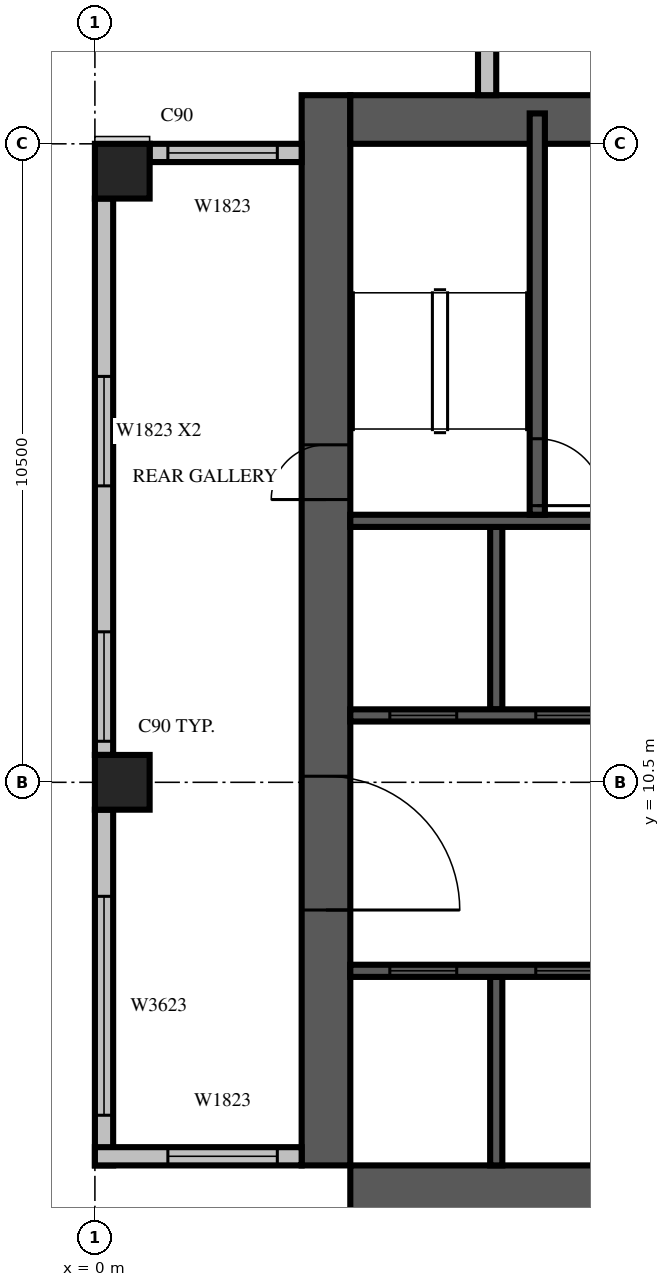
"""IFC4 building model, lengths in metres.
Left out: names, types, materials, properties, quantities, classifications, styles, units other than length and angle.
Written with IfcOpenShell. Run it as: python <this file> out.ifc"""

import sys

from ifc_helpers import new_model, si_unit, direction, frame, frame_2d, origin, origin_2d, place, context, subcontext, project, spatial, rectangle, extrude, source, transform, mapped, element, fill, save


model = new_model("IFC4")
c1 = context("Model", 3, precision=1e-05, world=origin(), true_north=direction((0.0, 1.0)))
c2 = subcontext(c1, "Body", "Model", "MODEL_VIEW")
j1 = project(units=[si_unit("LENGTHUNIT", "METRE"), si_unit("PLANEANGLEUNIT", "RADIAN")], contexts=[c1])
p1 = place(None, origin())
s1 = spatial("IfcSite", under=j1, at=p1, CompositionType="ELEMENT")
p2 = place(p1, origin())
s2 = spatial("IfcBuilding", under=s1, at=p2, CompositionType="ELEMENT")
p3 = place(p2, frame((0.0, 0.0, 212.0)))
s3 = spatial("IfcBuildingStorey", under=s2, at=p3, CompositionType="ELEMENT", Elevation=212.0)
m1 = source(origin(), c2, "Body", "SweptSolid", [
    extrude(rectangle(XDim=0.9, YDim=0.9, at=origin_2d()), origin(), (0.0, 0.0, 1.0), 3.8),
])
for number, where, z_axis, x_axis in (
    (1, (0.45, 10.5, 0.0), (0.0, 0.0, 1.0), (1.0, 0.0, 0.0)),
    (2, (0.45, 20.55, 0.0), (0.0, 0.0, 1.0), (1.0, 0.0, 0.0)),
):
    element("IfcColumn", number, at=place(p3, frame(where, z_axis=z_axis, x_axis=x_axis)), inside=s3, PredefinedType="COLUMN", context=c2, shape_type="MappedRepresentation", body=[
        mapped(m1, transform((0.0, 0.0, 0.0), scale=1.0)),
    ])
m2 = source(origin(), c2, "Body", "SweptSolid", [
    extrude(rectangle(XDim=17.6, YDim=0.8, at=frame_2d((8.8, 0.0))), origin(), (0.0, 0.0, 1.0), 3.8),
])
p4 = place(p3, frame((3.8, 4.2, 0.0), z_axis=(0.0, 0.0, 1.0), x_axis=(0.0, 1.0, 0.0)))
e3 = element("IfcWall", 3, at=p4, inside=s3, PredefinedType="SHEAR", context=c2, shape_type="MappedRepresentation", body=[
    mapped(m2, transform((0.0, 0.0, 0.0), scale=1.0)),
])
m3 = source(origin(), c2, "Body", "SweptSolid", [
    extrude(rectangle(XDim=2.2, YDim=2.1, at=frame_2d((1.1, 1.05))), frame((0.0, 0.41, 0.0), z_axis=(0.0, -1.0, 0.0), x_axis=(1.0, 0.0, 0.0)), (0.0, 0.0, 1.0), 0.82),
])
p5 = place(p4, frame((4.2, 0.0, 0.0)))
e4 = element("IfcOpeningElement", 4, at=p5, cuts=e3, PredefinedType="OPENING", context=c2, shape_type="MappedRepresentation", body=[
    mapped(m3, transform((0.0, 0.0, 0.0), scale=1.0)),
])
m4 = source(origin(), c2, "Body", "SweptSolid", [
    extrude(rectangle(XDim=0.9, YDim=2.1, at=frame_2d((0.45, 1.05))), frame((0.0, 0.41, 0.0), z_axis=(0.0, -1.0, 0.0), x_axis=(1.0, 0.0, 0.0)), (0.0, 0.0, 1.0), 0.82),
])
p6 = place(p4, frame((10.95, 0.0, 0.0)))
e5 = element("IfcOpeningElement", 5, at=p6, cuts=e3, PredefinedType="OPENING", context=c2, shape_type="MappedRepresentation", body=[
    mapped(m4, transform((0.0, 0.0, 0.0), scale=1.0)),
])
p7 = place(p3, frame((4.2, 3.8, 0.0), z_axis=(0.0, 0.0, 1.0), x_axis=(1.0, 0.0, 0.0)))
e6 = element("IfcWall", 6, at=p7, inside=s3, PredefinedType="SHEAR", context=c2, shape_type="MappedRepresentation", body=[
    mapped(m2, transform((0.0, 0.0, 0.0), scale=1.0)),
])
p8 = place(p7, frame((11.55, 0.0, 0.0)))
e7 = element("IfcOpeningElement", 7, at=p8, cuts=e6, PredefinedType="OPENING", context=c2, shape_type="MappedRepresentation", body=[
    mapped(m4, transform((0.0, 0.0, 0.0), scale=1.0)),
])
m5 = source(origin(), c2, "Body", "SweptSolid", [
    extrude(rectangle(XDim=16.8, YDim=0.8, at=frame_2d((8.4, 0.0))), origin(), (0.0, 0.0, 1.0), 3.8),
])
p9 = place(p3, frame((4.2, 21.4, 0.0), z_axis=(0.0, 0.0, 1.0), x_axis=(1.0, 0.0, 0.0)))
e8 = element("IfcWall", 8, at=p9, inside=s3, PredefinedType="SHEAR", context=c2, shape_type="MappedRepresentation", body=[
    mapped(m5, transform((0.0, 0.0, 0.0), scale=1.0)),
])
m6 = source(origin(), c2, "Body", "SweptSolid", [
    extrude(rectangle(XDim=1.2, YDim=2.1, at=frame_2d((0.6, 1.05))), frame((0.0, 0.41, 0.0), z_axis=(0.0, -1.0, 0.0), x_axis=(1.0, 0.0, 0.0)), (0.0, 0.0, 1.0), 0.82),
])
p10 = place(p9, frame((6.2, 0.0, 0.0)))
e9 = element("IfcOpeningElement", 9, at=p10, cuts=e8, PredefinedType="OPENING", context=c2, shape_type="MappedRepresentation", body=[
    mapped(m6, transform((0.0, 0.0, 0.0), scale=1.0)),
])
m7 = source(origin(), c2, "Body", "SweptSolid", [
    extrude(rectangle(XDim=16.6, YDim=0.3, at=frame_2d((8.3, 0.0))), origin(), (0.0, 0.0, 1.0), 3.4),
])
p11 = place(p3, frame((6.45, 38.4, 0.0), z_axis=(0.0, 0.0, 1.0), x_axis=(0.0, -1.0, 0.0)))
e10 = element("IfcWall", 10, at=p11, inside=s3, PredefinedType="STANDARD", context=c2, shape_type="MappedRepresentation", body=[
    mapped(m7, transform((0.0, 0.0, 0.0), scale=1.0)),
])
m8 = source(origin(), c2, "Body", "SweptSolid", [
    extrude(rectangle(XDim=1.8, YDim=2.3, at=frame_2d((0.9, 1.15))), frame((0.0, 0.16, 0.0), z_axis=(0.0, -1.0, 0.0), x_axis=(1.0, 0.0, 0.0)), (0.0, 0.0, 1.0), 0.32),
])
p12 = place(p11, frame((1.15, 0.0, 0.6)))
e11 = element("IfcOpeningElement", 11, at=p12, cuts=e10, PredefinedType="OPENING", context=c2, shape_type="MappedRepresentation", body=[
    mapped(m8, transform((0.0, 0.0, 0.0), scale=1.0)),
])
p13 = place(p11, frame((9.438, 0.0, 0.6)))
e12 = element("IfcOpeningElement", 12, at=p13, cuts=e10, PredefinedType="OPENING", context=c2, shape_type="MappedRepresentation", body=[
    mapped(m8, transform((0.0, 0.0, 0.0), scale=1.0)),
])
m9 = source(origin(), c2, "Body", "SweptSolid", [
    extrude(rectangle(XDim=1.2, YDim=2.3, at=frame_2d((0.6, 1.15))), frame((0.0, 0.16, 0.0), z_axis=(0.0, -1.0, 0.0), x_axis=(1.0, 0.0, 0.0)), (0.0, 0.0, 1.0), 0.32),
])
p14 = place(p11, frame((14.338, 0.0, 0.6)))
e13 = element("IfcOpeningElement", 13, at=p14, cuts=e10, PredefinedType="OPENING", context=c2, shape_type="MappedRepresentation", body=[
    mapped(m9, transform((0.0, 0.0, 0.0), scale=1.0)),
])
p15 = place(p11, frame((11.887, 0.0, 0.6)))
e14 = element("IfcOpeningElement", 14, at=p15, cuts=e10, PredefinedType="OPENING", context=c2, shape_type="MappedRepresentation", body=[
    mapped(m8, transform((0.0, 0.0, 0.0), scale=1.0)),
])
m10 = source(origin(), c2, "Body", "SweptSolid", [
    extrude(rectangle(XDim=1.0, YDim=2.1, at=frame_2d((0.5, 1.05))), frame((0.0, 0.16, 0.0), z_axis=(0.0, -1.0, 0.0), x_axis=(1.0, 0.0, 0.0)), (0.0, 0.0, 1.0), 0.32),
])
p16 = place(p11, frame((5.45, 0.0, 0.0)))
e15 = element("IfcOpeningElement", 15, at=p16, cuts=e10, PredefinedType="OPENING", context=c2, shape_type="MappedRepresentation", body=[
    mapped(m10, transform((0.0, 0.0, 0.0), scale=1.0)),
])
m11 = source(origin(), c2, "Body", "SweptSolid", [
    extrude(rectangle(XDim=2.5, YDim=0.3, at=frame_2d((1.25, 0.0))), origin(), (0.0, 0.0, 1.0), 3.4),
])
p17 = place(p3, frame((3.4, 20.85, 0.0), z_axis=(0.0, 0.0, 1.0), x_axis=(-1.0, 0.0, 0.0)))
e16 = element("IfcWall", 16, at=p17, inside=s3, PredefinedType="STANDARD", context=c2, shape_type="MappedRepresentation", body=[
    mapped(m11, transform((0.0, 0.0, 0.0), scale=1.0)),
])
p18 = place(p17, frame((0.4, 0.0, 0.6)))
e17 = element("IfcOpeningElement", 17, at=p18, cuts=e16, PredefinedType="OPENING", context=c2, shape_type="MappedRepresentation", body=[
    mapped(m8, transform((0.0, 0.0, 0.0), scale=1.0)),
])
m12 = source(origin(), c2, "Body", "SweptSolid", [
    extrude(rectangle(XDim=9.15, YDim=0.3, at=frame_2d((4.575, 0.0))), origin(), (0.0, 0.0, 1.0), 3.4),
])
p19 = place(p3, frame((0.15, 20.1, 0.0), z_axis=(0.0, 0.0, 1.0), x_axis=(0.0, -1.0, 0.0)))
e18 = element("IfcWall", 18, at=p19, inside=s3, PredefinedType="STANDARD", context=c2, shape_type="MappedRepresentation", body=[
    mapped(m12, transform((0.0, 0.0, 0.0), scale=1.0)),
])
p20 = place(p19, frame((2.925, 0.0, 0.6)))
e19 = element("IfcOpeningElement", 19, at=p20, cuts=e18, PredefinedType="OPENING", context=c2, shape_type="MappedRepresentation", body=[
    mapped(m8, transform((0.0, 0.0, 0.0), scale=1.0)),
])
p21 = place(p19, frame((7.125, 0.0, 0.6)))
e20 = element("IfcOpeningElement", 20, at=p21, cuts=e18, PredefinedType="OPENING", context=c2, shape_type="MappedRepresentation", body=[
    mapped(m8, transform((0.0, 0.0, 0.0), scale=1.0)),
])
m13 = source(origin(), c2, "Body", "SweptSolid", [
    extrude(rectangle(XDim=5.85, YDim=0.3, at=frame_2d((2.925, 0.0))), origin(), (0.0, 0.0, 1.0), 3.4),
])
p22 = place(p3, frame((0.15, 10.05, 0.0), z_axis=(0.0, 0.0, 1.0), x_axis=(0.0, -1.0, 0.0)))
e21 = element("IfcWall", 21, at=p22, inside=s3, PredefinedType="STANDARD", context=c2, shape_type="MappedRepresentation", body=[
    mapped(m13, transform((0.0, 0.0, 0.0), scale=1.0)),
])
m14 = source(origin(), c2, "Body", "SweptSolid", [
    extrude(rectangle(XDim=3.6, YDim=2.3, at=frame_2d((1.8, 1.15))), frame((0.0, 0.16, 0.0), z_axis=(0.0, -1.0, 0.0), x_axis=(1.0, 0.0, 0.0)), (0.0, 0.0, 1.0), 0.32),
])
p23 = place(p22, frame((1.425, 0.0, 0.6)))
e22 = element("IfcOpeningElement", 22, at=p23, cuts=e21, PredefinedType="OPENING", context=c2, shape_type="MappedRepresentation", body=[
    mapped(m14, transform((0.0, 0.0, 0.0), scale=1.0)),
])
m15 = source(origin(), c2, "Body", "SweptSolid", [
    extrude(rectangle(XDim=3.4, YDim=0.3, at=frame_2d((1.7, 0.0))), origin(), (0.0, 0.0, 1.0), 3.4),
])
p24 = place(p3, frame((0.0, 4.35, 0.0), z_axis=(0.0, 0.0, 1.0), x_axis=(1.0, 0.0, 0.0)))
e23 = element("IfcWall", 23, at=p24, inside=s3, PredefinedType="STANDARD", context=c2, shape_type="MappedRepresentation", body=[
    mapped(m15, transform((0.0, 0.0, 0.0), scale=1.0)),
])
p25 = place(p24, frame((1.2, 0.0, 0.6)))
e24 = element("IfcOpeningElement", 24, at=p25, cuts=e23, PredefinedType="OPENING", context=c2, shape_type="MappedRepresentation", body=[
    mapped(m8, transform((0.0, 0.0, 0.0), scale=1.0)),
])
m16 = source(origin(), c2, "Body", "SweptSolid", [
    extrude(rectangle(XDim=3.1, YDim=0.2, at=frame_2d((1.55, 0.0))), origin(), (0.0, 0.0, 1.0), 3.8),
])
p26 = place(p3, frame((6.6, 4.2, 0.0), z_axis=(0.0, 0.0, 1.0), x_axis=(0.0, 1.0, 0.0)))
e25 = element("IfcWall", 25, at=p26, inside=s3, PredefinedType="SOLIDWALL", context=c2, shape_type="MappedRepresentation", body=[
    mapped(m16, transform((0.0, 0.0, 0.0), scale=1.0)),
])
m17 = source(origin(), c2, "Body", "SweptSolid", [
    extrude(rectangle(XDim=3.0, YDim=0.2, at=frame_2d((1.5, 0.0))), origin(), (0.0, 0.0, 1.0), 3.8),
])
p27 = place(p3, frame((6.6, 11.7, 0.0), z_axis=(0.0, 0.0, 1.0), x_axis=(0.0, 1.0, 0.0)))
e26 = element("IfcWall", 26, at=p27, inside=s3, PredefinedType="SOLIDWALL", context=c2, shape_type="MappedRepresentation", body=[
    mapped(m17, transform((0.0, 0.0, 0.0), scale=1.0)),
])
m18 = source(origin(), c2, "Body", "SweptSolid", [
    extrude(rectangle(XDim=9.6, YDim=0.2, at=frame_2d((4.8, 0.0))), origin(), (0.0, 0.0, 1.0), 3.8),
])
p28 = place(p3, frame((4.2, 7.4, 0.0), z_axis=(0.0, 0.0, 1.0), x_axis=(1.0, 0.0, 0.0)))
e27 = element("IfcWall", 27, at=p28, inside=s3, PredefinedType="SOLIDWALL", context=c2, shape_type="MappedRepresentation", body=[
    mapped(m18, transform((0.0, 0.0, 0.0), scale=1.0)),
])
m19 = source(origin(), c2, "Body", "SweptSolid", [
    extrude(rectangle(XDim=1.1, YDim=2.1, at=frame_2d((0.55, 1.05))), frame((0.0, 0.11, 0.0), z_axis=(0.0, -1.0, 0.0), x_axis=(1.0, 0.0, 0.0)), (0.0, 0.0, 1.0), 0.22),
])
p29 = place(p28, frame((0.65, 0.0, 0.0)))
e28 = element("IfcOpeningElement", 28, at=p29, cuts=e27, PredefinedType="OPENING", context=c2, shape_type="MappedRepresentation", body=[
    mapped(m19, transform((0.0, 0.0, 0.0), scale=1.0)),
])
p30 = place(p28, frame((3.05, 0.0, 0.0)))
e29 = element("IfcOpeningElement", 29, at=p30, cuts=e27, PredefinedType="OPENING", context=c2, shape_type="MappedRepresentation", body=[
    mapped(m19, transform((0.0, 0.0, 0.0), scale=1.0)),
])
p31 = place(p28, frame((5.45, 0.0, 0.0)))
e30 = element("IfcOpeningElement", 30, at=p31, cuts=e27, PredefinedType="OPENING", context=c2, shape_type="MappedRepresentation", body=[
    mapped(m19, transform((0.0, 0.0, 0.0), scale=1.0)),
])
p32 = place(p28, frame((7.85, 0.0, 0.0)))
e31 = element("IfcOpeningElement", 31, at=p32, cuts=e27, PredefinedType="OPENING", context=c2, shape_type="MappedRepresentation", body=[
    mapped(m19, transform((0.0, 0.0, 0.0), scale=1.0)),
])
m20 = source(origin(), c2, "Body", "SweptSolid", [
    extrude(rectangle(XDim=4.8, YDim=0.2, at=frame_2d((2.4, 0.0))), origin(), (0.0, 0.0, 1.0), 3.8),
])
p33 = place(p3, frame((4.2, 11.6, 0.0), z_axis=(0.0, 0.0, 1.0), x_axis=(1.0, 0.0, 0.0)))
e32 = element("IfcWall", 32, at=p33, inside=s3, PredefinedType="SOLIDWALL", context=c2, shape_type="MappedRepresentation", body=[
    mapped(m20, transform((0.0, 0.0, 0.0), scale=1.0)),
])
p34 = place(p33, frame((0.65, 0.0, 0.0)))
e33 = element("IfcOpeningElement", 33, at=p34, cuts=e32, PredefinedType="OPENING", context=c2, shape_type="MappedRepresentation", body=[
    mapped(m19, transform((0.0, 0.0, 0.0), scale=1.0)),
])
p35 = place(p33, frame((3.05, 0.0, 0.0)))
e34 = element("IfcOpeningElement", 34, at=p35, cuts=e32, PredefinedType="OPENING", context=c2, shape_type="MappedRepresentation", body=[
    mapped(m19, transform((0.0, 0.0, 0.0), scale=1.0)),
])
p36 = place(p3, frame((4.2, 14.8, 0.0), z_axis=(0.0, 0.0, 1.0), x_axis=(1.0, 0.0, 0.0)))
e35 = element("IfcWall", 35, at=p36, inside=s3, PredefinedType="SOLIDWALL", context=c2, shape_type="MappedRepresentation", body=[
    mapped(m20, transform((0.0, 0.0, 0.0), scale=1.0)),
])
m21 = source(origin(), c2, "Body", "SweptSolid", [
    extrude(rectangle(XDim=6.6, YDim=0.25, at=frame_2d((3.3, 0.0))), origin(), (0.0, 0.0, 1.0), 3.4),
])
p37 = place(p3, frame((7.275, 14.9, 0.0), z_axis=(0.0, 0.0, 1.0), x_axis=(0.0, 1.0, 0.0)))
e36 = element("IfcWall", 36, at=p37, inside=s3, PredefinedType="SOLIDWALL", context=c2, shape_type="MappedRepresentation", body=[
    mapped(m21, transform((0.0, 0.0, 0.0), scale=1.0)),
])
m22 = source(origin(), c2, "Body", "SweptSolid", [
    extrude(rectangle(XDim=1.1, YDim=2.1, at=frame_2d((0.55, 1.05))), frame((0.0, 0.135, 0.0), z_axis=(0.0, -1.0, 0.0), x_axis=(1.0, 0.0, 0.0)), (0.0, 0.0, 1.0), 0.27),
])
p38 = place(p37, frame((0.15, 0.0, 0.0)))
e37 = element("IfcOpeningElement", 37, at=p38, cuts=e36, PredefinedType="OPENING", context=c2, shape_type="MappedRepresentation", body=[
    mapped(m22, transform((0.0, 0.0, 0.0), scale=1.0)),
])
m23 = source(origin(), c2, "Body", "SweptSolid", [
    extrude(rectangle(XDim=1.8, YDim=2.3, at=frame_2d((0.9, 1.15))), frame((0.0, 0.03, 0.0), z_axis=(0.0, -1.0, 0.0), x_axis=(1.0, 0.0, 0.0)), (0.0, 0.0, 1.0), 0.06),
])
p39 = place(p18, origin())
e38 = element("IfcWindow", 38, at=p39, inside=s3, PartitioningType="SINGLE_PANEL", PredefinedType="WINDOW", context=c2, shape_type="MappedRepresentation", body=[
    mapped(m23, transform((0.0, 0.0, 0.0), scale=1.0)),
])
fill(e17, e38)
p40 = place(p20, origin())
e39 = element("IfcWindow", 39, at=p40, inside=s3, PartitioningType="SINGLE_PANEL", PredefinedType="WINDOW", context=c2, shape_type="MappedRepresentation", body=[
    mapped(m23, transform((0.0, 0.0, 0.0), scale=1.0)),
])
fill(e19, e39)
p41 = place(p21, origin())
e40 = element("IfcWindow", 40, at=p41, inside=s3, PartitioningType="SINGLE_PANEL", PredefinedType="WINDOW", context=c2, shape_type="MappedRepresentation", body=[
    mapped(m23, transform((0.0, 0.0, 0.0), scale=1.0)),
])
fill(e20, e40)
m24 = source(origin(), c2, "Body", "SweptSolid", [
    extrude(rectangle(XDim=3.6, YDim=2.3, at=frame_2d((1.8, 1.15))), frame((0.0, 0.03, 0.0), z_axis=(0.0, -1.0, 0.0), x_axis=(1.0, 0.0, 0.0)), (0.0, 0.0, 1.0), 0.06),
])
p42 = place(p23, origin())
e41 = element("IfcWindow", 41, at=p42, inside=s3, PartitioningType="SINGLE_PANEL", PredefinedType="WINDOW", context=c2, shape_type="MappedRepresentation", body=[
    mapped(m24, transform((0.0, 0.0, 0.0), scale=1.0)),
])
fill(e22, e41)
p43 = place(p25, origin())
e42 = element("IfcWindow", 42, at=p43, inside=s3, PartitioningType="SINGLE_PANEL", PredefinedType="WINDOW", context=c2, shape_type="MappedRepresentation", body=[
    mapped(m23, transform((0.0, 0.0, 0.0), scale=1.0)),
])
fill(e24, e42)
m25 = source(origin(), c2, "Body", "SweptSolid", [
    extrude(rectangle(XDim=1.1, YDim=2.1, at=frame_2d((0.55, 1.05))), frame((0.0, 0.025, 0.0), z_axis=(0.0, -1.0, 0.0), x_axis=(1.0, 0.0, 0.0)), (0.0, 0.0, 1.0), 0.05),
])
p44 = place(p29, origin())
e43 = element("IfcDoor", 43, at=p44, inside=s3, OperationType="SLIDING_TO_LEFT", PredefinedType="DOOR", context=c2, shape_type="MappedRepresentation", body=[
    mapped(m25, transform((0.0, 0.0, 0.0), scale=1.0)),
])
fill(e28, e43)
p45 = place(p30, origin())
e44 = element("IfcDoor", 44, at=p45, inside=s3, OperationType="SLIDING_TO_LEFT", PredefinedType="DOOR", context=c2, shape_type="MappedRepresentation", body=[
    mapped(m25, transform((0.0, 0.0, 0.0), scale=1.0)),
])
fill(e29, e44)
p46 = place(p34, origin())
e45 = element("IfcDoor", 45, at=p46, inside=s3, OperationType="SLIDING_TO_LEFT", PredefinedType="DOOR", context=c2, shape_type="MappedRepresentation", body=[
    mapped(m25, transform((0.0, 0.0, 0.0), scale=1.0)),
])
fill(e33, e45)
p47 = place(p35, origin())
e46 = element("IfcDoor", 46, at=p47, inside=s3, OperationType="SLIDING_TO_LEFT", PredefinedType="DOOR", context=c2, shape_type="MappedRepresentation", body=[
    mapped(m25, transform((0.0, 0.0, 0.0), scale=1.0)),
])
fill(e34, e46)
p48 = place(p38, origin())
e47 = element("IfcDoor", 47, at=p48, inside=s3, OperationType="SINGLE_SWING_RIGHT", PredefinedType="DOOR", context=c2, shape_type="MappedRepresentation", body=[
    mapped(m25, transform((0.0, 0.0, 0.0), scale=1.0)),
])
fill(e37, e47)
m26 = source(origin(), c2, "Body", "SweptSolid", [
    extrude(rectangle(XDim=2.2, YDim=2.1, at=frame_2d((1.1, 1.05))), frame((0.0, 0.025, 0.0), z_axis=(0.0, -1.0, 0.0), x_axis=(1.0, 0.0, 0.0)), (0.0, 0.0, 1.0), 0.05),
])
p49 = place(p5, origin())
e48 = element("IfcDoor", 48, at=p49, inside=s3, OperationType="DOUBLE_DOOR_SINGLE_SWING", PredefinedType="DOOR", context=c2, shape_type="MappedRepresentation", body=[
    mapped(m26, transform((0.0, 0.0, 0.0), scale=1.0)),
])
fill(e4, e48)
m27 = source(origin(), c2, "Body", "SweptSolid", [
    extrude(rectangle(XDim=0.9, YDim=2.1, at=frame_2d((0.45, 1.05))), frame((0.0, 0.025, 0.0), z_axis=(0.0, -1.0, 0.0), x_axis=(1.0, 0.0, 0.0)), (0.0, 0.0, 1.0), 0.05),
])
p50 = place(p6, origin())
e49 = element("IfcDoor", 49, at=p50, inside=s3, OperationType="SINGLE_SWING_LEFT", PredefinedType="DOOR", context=c2, shape_type="MappedRepresentation", body=[
    mapped(m27, transform((0.0, 0.0, 0.0), scale=1.0)),
])
fill(e5, e49)
save(model, sys.argv[1])
